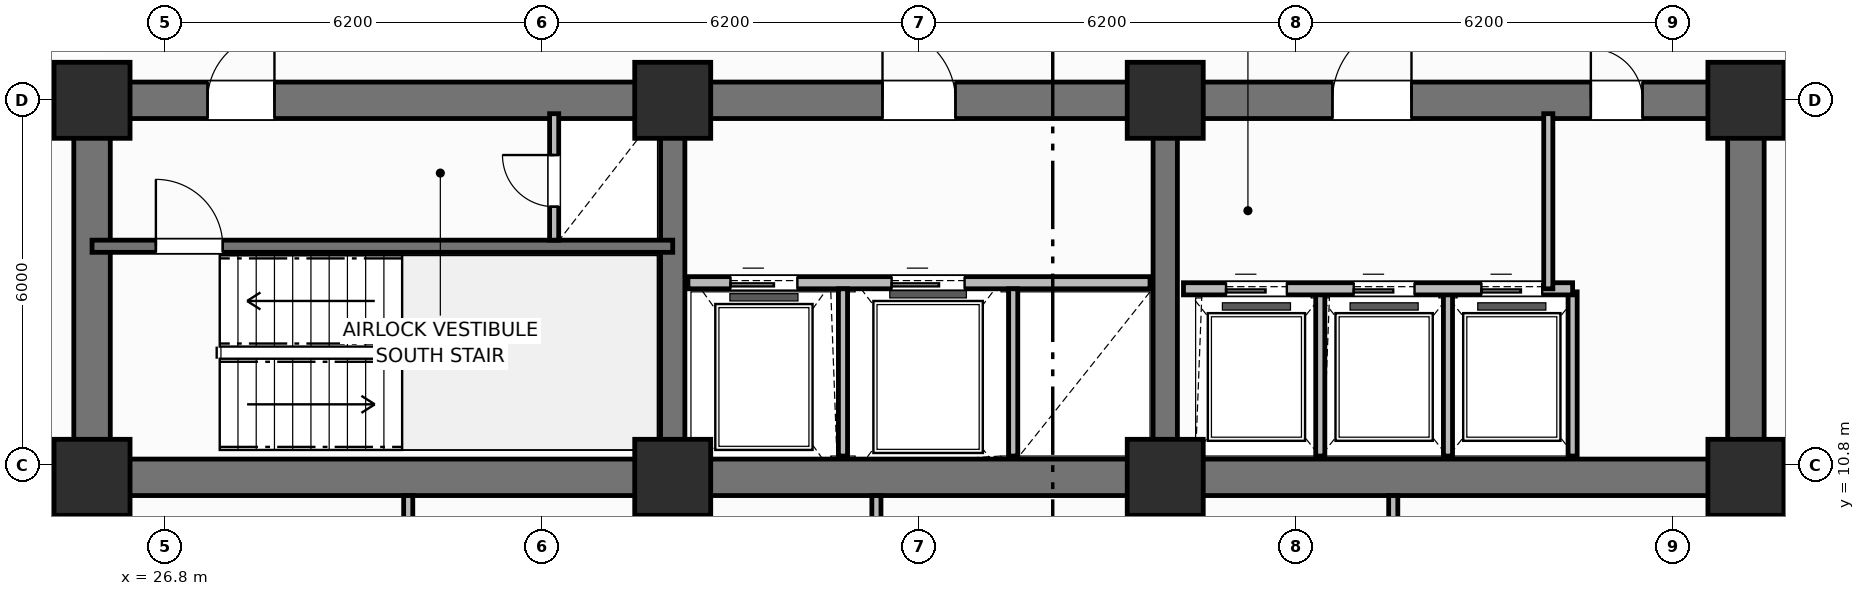
"""IFC4 building model, lengths in metres.
Left out: names, types, materials, properties, quantities, classifications, styles, units other than length and angle.
Written with IfcOpenShell. Run it as: python <this file> out.ifc"""

import sys

from ifc_helpers import new_model, si_unit, direction, frame, frame_2d, origin, origin_2d, place, context, subcontext, project, spatial, rectangle, extrude, element, fill, save


model = new_model("IFC4")
c1 = context("Model", 3, precision=1e-05, world=origin(), true_north=direction((0.0, 1.0)))
c2 = subcontext(c1, "Body", "Model", "MODEL_VIEW")
j1 = project(units=[si_unit("LENGTHUNIT", "METRE"), si_unit("PLANEANGLEUNIT", "RADIAN")], contexts=[c1])
p1 = place(None, origin())
s1 = spatial("IfcSite", under=j1, at=p1, CompositionType="ELEMENT")
p2 = place(p1, origin())
s2 = spatial("IfcBuilding", under=s1, at=p2, CompositionType="ELEMENT")
p3 = place(p2, frame((0.0, 0.0, 62.1)))
s3 = spatial("IfcBuildingStorey", under=s2, at=p3, CompositionType="ELEMENT", Elevation=62.1)
p4 = place(p3, frame((52.8, 10.6, 0.0), z_axis=(0.0, 0.0, 1.0), x_axis=(-1.0, 0.0, 0.0)))
e1 = element("IfcWall", 1, at=p4, inside=s3, PredefinedType="SHEAR", context=c2, shape_type="SweptSolid", body=[
    extrude(rectangle(XDim=27.2, YDim=0.6, at=frame_2d((13.6, 0.0))), origin(), (0.0, 0.0, 1.0), 3.7),
])
for number, where, z_axis, x_axis in (
    (2, (25.6, 10.9, 0.0), (0.0, 0.0, 1.0), (0.0, 1.0, 0.0)),
    (3, (52.8, 10.9, 0.0), (0.0, 0.0, 1.0), (0.0, 1.0, 0.0)),
):
    element("IfcWall", number, at=place(p3, frame(where, z_axis=z_axis, x_axis=x_axis)), inside=s3, PredefinedType="SHEAR", context=c2, shape_type="SweptSolid", body=[
        extrude(rectangle(XDim=5.6, YDim=0.6, at=frame_2d((2.8, 0.0))), origin(), (0.0, 0.0, 1.0), 3.7),
    ])
p5 = place(p3, frame((25.6, 16.8, 0.0), z_axis=(0.0, 0.0, 1.0), x_axis=(1.0, 0.0, 0.0)))
e4 = element("IfcWall", 4, at=p5, inside=s3, PredefinedType="SHEAR", context=c2, shape_type="SweptSolid", body=[
    extrude(rectangle(XDim=27.2, YDim=0.6, at=frame_2d((13.6, 0.0))), origin(), (0.0, 0.0, 1.0), 3.7),
])
p6 = place(p5, frame((1.9, 0.0, 0.0)))
e5 = element("IfcOpeningElement", 5, at=p6, cuts=e4, PredefinedType="OPENING", context=c2, shape_type="SweptSolid", body=[
    extrude(rectangle(XDim=1.1, YDim=2.15, at=frame_2d((0.55, 1.075))), frame((0.0, 0.31, 0.0), z_axis=(0.0, -1.0, 0.0), x_axis=(1.0, 0.0, 0.0)), (0.0, 0.0, 1.0), 0.62),
])
p7 = place(p5, frame((13.0, 0.0, 0.0)))
e6 = element("IfcOpeningElement", 6, at=p7, cuts=e4, PredefinedType="OPENING", context=c2, shape_type="SweptSolid", body=[
    extrude(rectangle(XDim=1.2, YDim=2.15, at=frame_2d((0.6, 1.075))), frame((0.0, 0.31, 0.0), z_axis=(0.0, -1.0, 0.0), x_axis=(1.0, 0.0, 0.0)), (0.0, 0.0, 1.0), 0.62),
])
p8 = place(p5, frame((20.4, 0.0, 0.0)))
e7 = element("IfcOpeningElement", 7, at=p8, cuts=e4, PredefinedType="OPENING", context=c2, shape_type="SweptSolid", body=[
    extrude(rectangle(XDim=1.3, YDim=2.2, at=frame_2d((0.65, 1.1))), frame((0.0, 0.31, 0.0), z_axis=(0.0, -1.0, 0.0), x_axis=(1.0, 0.0, 0.0)), (0.0, 0.0, 1.0), 0.62),
])
p9 = place(p5, frame((24.65, 0.0, 0.0)))
e8 = element("IfcOpeningElement", 8, at=p9, cuts=e4, PredefinedType="OPENING", context=c2, shape_type="SweptSolid", body=[
    extrude(rectangle(XDim=0.85, YDim=2.1, at=frame_2d((0.425, 1.05))), frame((0.0, 0.31, 0.0), z_axis=(0.0, -1.0, 0.0), x_axis=(1.0, 0.0, 0.0)), (0.0, 0.0, 1.0), 0.62),
])
for number, where, z_axis, x_axis in (
    (9, (35.15, 10.9, 0.0), (0.0, 0.0, 1.0), (0.0, 1.0, 0.0)),
    (10, (43.25, 10.9, 0.0), (0.0, 0.0, 1.0), (0.0, 1.0, 0.0)),
):
    element("IfcWall", number, at=place(p3, frame(where, z_axis=z_axis, x_axis=x_axis)), inside=s3, PredefinedType="SHEAR", context=c2, shape_type="SweptSolid", body=[
        extrude(rectangle(XDim=5.6, YDim=0.4, at=frame_2d((2.8, 0.0))), origin(), (0.0, 0.0, 1.0), 3.7),
    ])
for number, where, z_axis, x_axis in (
    (11, (25.6, 10.6, 0.0), (0.0, 0.0, 1.0), (1.0, 0.0, 0.0)),
    (12, (25.6, 16.8, 0.0), (0.0, 0.0, 1.0), (1.0, 0.0, 0.0)),
    (13, (35.15, 10.6, 0.0), (0.0, 0.0, 1.0), (1.0, 0.0, 0.0)),
    (14, (35.15, 16.8, 0.0), (0.0, 0.0, 1.0), (1.0, 0.0, 0.0)),
    (15, (43.25, 10.6, 0.0), (0.0, 0.0, 1.0), (1.0, 0.0, 0.0)),
    (16, (43.25, 16.8, 0.0), (0.0, 0.0, 1.0), (1.0, 0.0, 0.0)),
    (17, (52.8, 10.6, 0.0), (0.0, 0.0, 1.0), (1.0, 0.0, 0.0)),
    (18, (52.8, 16.8, 0.0), (0.0, 0.0, 1.0), (1.0, 0.0, 0.0)),
):
    element("IfcColumn", number, at=place(p3, frame(where, z_axis=z_axis, x_axis=x_axis)), inside=s3, PredefinedType="COLUMN", context=c2, shape_type="SweptSolid", body=[
        extrude(rectangle(XDim=1.25, YDim=1.25, at=origin_2d()), origin(), (0.0, 0.0, 1.0), 3.7),
    ])
p10 = place(p3, frame((25.6, 14.4, 0.0), z_axis=(0.0, 0.0, 1.0), x_axis=(1.0, 0.0, 0.0)))
e19 = element("IfcWall", 19, at=p10, inside=s3, PredefinedType="SHEAR", context=c2, shape_type="SweptSolid", body=[
    extrude(rectangle(XDim=9.55, YDim=0.2, at=frame_2d((4.775, 0.0))), origin(), (0.0, 0.0, 1.0), 3.7),
])
p11 = place(p10, frame((1.05, 0.0, 0.0)))
e20 = element("IfcOpeningElement", 20, at=p11, cuts=e19, PredefinedType="OPENING", context=c2, shape_type="SweptSolid", body=[
    extrude(rectangle(XDim=1.1, YDim=2.15, at=frame_2d((0.55, 1.075))), frame((0.0, 0.11, 0.0), z_axis=(0.0, -1.0, 0.0), x_axis=(1.0, 0.0, 0.0)), (0.0, 0.0, 1.0), 0.22),
])
p12 = place(p3, frame((33.2, 14.5, 0.0), z_axis=(0.0, 0.0, 1.0), x_axis=(0.0, 1.0, 0.0)))
e21 = element("IfcWall", 21, at=p12, inside=s3, PredefinedType="PARTITIONING", context=c2, shape_type="SweptSolid", body=[
    extrude(rectangle(XDim=2.08, YDim=0.15, at=frame_2d((1.04, 0.0))), origin(), (0.0, 0.0, 1.0), 2.53),
])
p13 = place(p12, frame((0.55, 0.0, 0.0)))
e22 = element("IfcOpeningElement", 22, at=p13, cuts=e21, PredefinedType="OPENING", context=c2, shape_type="SweptSolid", body=[
    extrude(rectangle(XDim=0.85, YDim=2.05, at=frame_2d((0.425, 1.025))), frame((0.0, 0.085, 0.0), z_axis=(0.0, -1.0, 0.0), x_axis=(1.0, 0.0, 0.0)), (0.0, 0.0, 1.0), 0.17),
])
p14 = place(p3, frame((35.4, 13.8, 0.0), z_axis=(0.0, 0.0, 1.0), x_axis=(1.0, 0.0, 0.0)))
e23 = element("IfcWall", 23, at=p14, inside=s3, PredefinedType="PARTITIONING", context=c2, shape_type="SweptSolid", body=[
    extrude(rectangle(XDim=7.6, YDim=0.2, at=frame_2d((3.8, 0.0))), origin(), (0.0, 0.0, 1.0), 2.3),
])
p15 = place(p14, frame((0.7, 0.0, 0.0)))
e24 = element("IfcOpeningElement", 24, at=p15, cuts=e23, PredefinedType="OPENING", context=c2, shape_type="SweptSolid", body=[
    extrude(rectangle(XDim=1.1, YDim=2.15, at=frame_2d((0.55, 1.075))), frame((0.0, 0.11, 0.0), z_axis=(0.0, -1.0, 0.0), x_axis=(1.0, 0.0, 0.0)), (0.0, 0.0, 1.0), 0.22),
])
p16 = place(p14, frame((3.35, 0.0, 0.0)))
e25 = element("IfcOpeningElement", 25, at=p16, cuts=e23, PredefinedType="OPENING", context=c2, shape_type="SweptSolid", body=[
    extrude(rectangle(XDim=1.2, YDim=2.15, at=frame_2d((0.6, 1.075))), frame((0.0, 0.11, 0.0), z_axis=(0.0, -1.0, 0.0), x_axis=(1.0, 0.0, 0.0)), (0.0, 0.0, 1.0), 0.22),
])
for number, where, z_axis, x_axis in (
    (26, (37.95, 10.95, 0.0), (0.0, 0.0, 1.0), (0.0, 1.0, 0.0)),
    (27, (40.75, 10.95, 0.0), (0.0, 0.0, 1.0), (0.0, 1.0, 0.0)),
):
    element("IfcWall", number, at=place(p3, frame(where, z_axis=z_axis, x_axis=x_axis)), inside=s3, PredefinedType="PARTITIONING", context=c2, shape_type="SweptSolid", body=[
        extrude(rectangle(XDim=2.75, YDim=0.15, at=frame_2d((1.375, 0.0))), origin(), (0.0, 0.0, 1.0), 2.53),
    ])
for number, where, z_axis, x_axis in (
    (28, (45.8, 10.95, 0.0), (0.0, 0.0, 1.0), (0.0, 1.0, 0.0)),
    (29, (47.9, 10.95, 0.0), (0.0, 0.0, 1.0), (0.0, 1.0, 0.0)),
    (30, (49.95, 10.95, 0.0), (0.0, 0.0, 1.0), (0.0, 1.0, 0.0)),
):
    element("IfcWall", number, at=place(p3, frame(where, z_axis=z_axis, x_axis=x_axis)), inside=s3, PredefinedType="PARTITIONING", context=c2, shape_type="SweptSolid", body=[
        extrude(rectangle(XDim=2.7, YDim=0.15, at=frame_2d((1.35, 0.0))), origin(), (0.0, 0.0, 1.0), 2.53),
    ])
p17 = place(p3, frame((43.55, 13.7, 0.0), z_axis=(0.0, 0.0, 1.0), x_axis=(1.0, 0.0, 0.0)))
e31 = element("IfcWall", 31, at=p17, inside=s3, PredefinedType="PARTITIONING", context=c2, shape_type="SweptSolid", body=[
    extrude(rectangle(XDim=6.4, YDim=0.2, at=frame_2d((3.2, 0.0))), origin(), (0.0, 0.0, 1.0), 2.53),
])
p18 = place(p17, frame((0.7, 0.0, 0.0)))
e32 = element("IfcOpeningElement", 32, at=p18, cuts=e31, PredefinedType="OPENING", context=c2, shape_type="SweptSolid", body=[
    extrude(rectangle(XDim=1.0, YDim=2.15, at=frame_2d((0.5, 1.075))), frame((0.0, 0.11, 0.0), z_axis=(0.0, -1.0, 0.0), x_axis=(1.0, 0.0, 0.0)), (0.0, 0.0, 1.0), 0.22),
])
p19 = place(p17, frame((2.8, 0.0, 0.0)))
e33 = element("IfcOpeningElement", 33, at=p19, cuts=e31, PredefinedType="OPENING", context=c2, shape_type="SweptSolid", body=[
    extrude(rectangle(XDim=1.0, YDim=2.15, at=frame_2d((0.5, 1.075))), frame((0.0, 0.11, 0.0), z_axis=(0.0, -1.0, 0.0), x_axis=(1.0, 0.0, 0.0)), (0.0, 0.0, 1.0), 0.22),
])
p20 = place(p17, frame((4.9, 0.0, 0.0)))
e34 = element("IfcOpeningElement", 34, at=p20, cuts=e31, PredefinedType="OPENING", context=c2, shape_type="SweptSolid", body=[
    extrude(rectangle(XDim=1.0, YDim=2.15, at=frame_2d((0.5, 1.075))), frame((0.0, 0.11, 0.0), z_axis=(0.0, -1.0, 0.0), x_axis=(1.0, 0.0, 0.0)), (0.0, 0.0, 1.0), 0.22),
])
p21 = place(p3, frame((49.55, 13.7, 0.0), z_axis=(0.0, 0.0, 1.0), x_axis=(0.0, 1.0, 0.0)))
e35 = element("IfcWall", 35, at=p21, inside=s3, PredefinedType="PARTITIONING", context=c2, shape_type="SweptSolid", body=[
    extrude(rectangle(XDim=2.88, YDim=0.15, at=frame_2d((1.44, 0.0))), origin(), (0.0, 0.0, 1.0), 2.53),
])
p22 = place(p3, frame((30.8, 4.97, 0.0), z_axis=(0.0, 0.0, 1.0), x_axis=(0.0, 1.0, 0.0)))
e36 = element("IfcWall", 36, at=p22, inside=s3, PredefinedType="PARTITIONING", context=c2, shape_type="SweptSolid", body=[
    extrude(rectangle(XDim=5.33, YDim=0.15, at=frame_2d((2.665, 0.0))), origin(), (0.0, 0.0, 1.0), 2.53),
])
p23 = place(p22, frame((1.4, 0.0, 0.0)))
e37 = element("IfcOpeningElement", 37, at=p23, cuts=e36, PredefinedType="OPENING", context=c2, shape_type="SweptSolid", body=[
    extrude(rectangle(XDim=0.9, YDim=2.1, at=frame_2d((0.45, 1.05))), frame((0.0, 0.085, 0.0), z_axis=(0.0, -1.0, 0.0), x_axis=(1.0, 0.0, 0.0)), (0.0, 0.0, 1.0), 0.17),
])
p24 = place(p3, frame((38.5, 4.97, 0.0), z_axis=(0.0, 0.0, 1.0), x_axis=(0.0, 1.0, 0.0)))
e38 = element("IfcWall", 38, at=p24, inside=s3, PredefinedType="PARTITIONING", context=c2, shape_type="SweptSolid", body=[
    extrude(rectangle(XDim=5.33, YDim=0.15, at=frame_2d((2.665, 0.0))), origin(), (0.0, 0.0, 1.0), 2.53),
])
p25 = place(p3, frame((47.0, 4.97, 0.0), z_axis=(0.0, 0.0, 1.0), x_axis=(0.0, 1.0, 0.0)))
e39 = element("IfcWall", 39, at=p25, inside=s3, PredefinedType="PARTITIONING", context=c2, shape_type="SweptSolid", body=[
    extrude(rectangle(XDim=5.33, YDim=0.15, at=frame_2d((2.665, 0.0))), origin(), (0.0, 0.0, 1.0), 2.53),
])
p26 = place(p25, frame((1.4, 0.0, 0.0)))
e40 = element("IfcOpeningElement", 40, at=p26, cuts=e39, PredefinedType="OPENING", context=c2, shape_type="SweptSolid", body=[
    extrude(rectangle(XDim=0.9, YDim=2.1, at=frame_2d((0.45, 1.05))), frame((0.0, 0.085, 0.0), z_axis=(0.0, -1.0, 0.0), x_axis=(1.0, 0.0, 0.0)), (0.0, 0.0, 1.0), 0.17),
])
p27 = place(p3, frame((25.4, 5.72, 0.0), z_axis=(0.0, 0.0, 1.0), x_axis=(0.0, 1.0, 0.0)))
e41 = element("IfcWall", 41, at=p27, inside=s3, PredefinedType="PARTITIONING", context=c2, shape_type="SweptSolid", body=[
    extrude(rectangle(XDim=4.58, YDim=0.2, at=frame_2d((2.29, 0.0))), origin(), (0.0, 0.0, 1.0), 2.53),
])
p28 = place(p27, frame((1.05, 0.0, 0.0)))
e42 = element("IfcOpeningElement", 42, at=p28, cuts=e41, PredefinedType="OPENING", context=c2, shape_type="SweptSolid", body=[
    extrude(rectangle(XDim=0.9, YDim=2.1, at=frame_2d((0.45, 1.05))), frame((0.0, 0.11, 0.0), z_axis=(0.0, -1.0, 0.0), x_axis=(1.0, 0.0, 0.0)), (0.0, 0.0, 1.0), 0.22),
])
p29 = place(p3, frame((53.0, 5.72, 0.0), z_axis=(0.0, 0.0, 1.0), x_axis=(0.0, 1.0, 0.0)))
e43 = element("IfcWall", 43, at=p29, inside=s3, PredefinedType="PARTITIONING", context=c2, shape_type="SweptSolid", body=[
    extrude(rectangle(XDim=4.58, YDim=0.2, at=frame_2d((2.29, 0.0))), origin(), (0.0, 0.0, 1.0), 2.53),
])
p30 = place(p29, frame((1.05, 0.0, 0.0)))
e44 = element("IfcOpeningElement", 44, at=p30, cuts=e43, PredefinedType="OPENING", context=c2, shape_type="SweptSolid", body=[
    extrude(rectangle(XDim=0.9, YDim=2.1, at=frame_2d((0.45, 1.05))), frame((0.0, 0.11, 0.0), z_axis=(0.0, -1.0, 0.0), x_axis=(1.0, 0.0, 0.0)), (0.0, 0.0, 1.0), 0.22),
])
p31 = place(p11, origin())
e45 = element("IfcDoor", 45, at=p31, inside=s3, OperationType="SINGLE_SWING_LEFT", PredefinedType="DOOR", context=c2, shape_type="SweptSolid", body=[
    extrude(rectangle(XDim=1.1, YDim=2.15, at=frame_2d((0.55, 1.075))), frame((0.0, 0.025, 0.0), z_axis=(0.0, -1.0, 0.0), x_axis=(1.0, 0.0, 0.0)), (0.0, 0.0, 1.0), 0.05),
])
fill(e20, e45)
p32 = place(p13, origin())
e46 = element("IfcDoor", 46, at=p32, inside=s3, OperationType="SINGLE_SWING_RIGHT", PredefinedType="TRAPDOOR", context=c2, shape_type="SweptSolid", body=[
    extrude(rectangle(XDim=0.85, YDim=2.05, at=frame_2d((0.425, 1.025))), frame((0.0, 0.025, 0.0), z_axis=(0.0, -1.0, 0.0), x_axis=(1.0, 0.0, 0.0)), (0.0, 0.0, 1.0), 0.05),
])
fill(e22, e46)
p33 = place(p15, origin())
e47 = element("IfcDoor", 47, at=p33, inside=s3, OperationType="SLIDING_TO_LEFT", PredefinedType="DOOR", context=c2, shape_type="SweptSolid", body=[
    extrude(rectangle(XDim=1.1, YDim=2.15, at=frame_2d((0.55, 1.075))), frame((0.0, 0.025, 0.0), z_axis=(0.0, -1.0, 0.0), x_axis=(1.0, 0.0, 0.0)), (0.0, 0.0, 1.0), 0.05),
])
fill(e24, e47)
p34 = place(p16, origin())
e48 = element("IfcDoor", 48, at=p34, inside=s3, OperationType="SLIDING_TO_LEFT", PredefinedType="DOOR", context=c2, shape_type="SweptSolid", body=[
    extrude(rectangle(XDim=1.2, YDim=2.15, at=frame_2d((0.6, 1.075))), frame((0.0, 0.025, 0.0), z_axis=(0.0, -1.0, 0.0), x_axis=(1.0, 0.0, 0.0)), (0.0, 0.0, 1.0), 0.05),
])
fill(e25, e48)
p35 = place(p18, origin())
e49 = element("IfcDoor", 49, at=p35, inside=s3, OperationType="SLIDING_TO_LEFT", PredefinedType="DOOR", context=c2, shape_type="SweptSolid", body=[
    extrude(rectangle(XDim=1.0, YDim=2.15, at=frame_2d((0.5, 1.075))), frame((0.0, 0.025, 0.0), z_axis=(0.0, -1.0, 0.0), x_axis=(1.0, 0.0, 0.0)), (0.0, 0.0, 1.0), 0.05),
])
fill(e32, e49)
p36 = place(p19, origin())
e50 = element("IfcDoor", 50, at=p36, inside=s3, OperationType="SLIDING_TO_LEFT", PredefinedType="DOOR", context=c2, shape_type="SweptSolid", body=[
    extrude(rectangle(XDim=1.0, YDim=2.15, at=frame_2d((0.5, 1.075))), frame((0.0, 0.025, 0.0), z_axis=(0.0, -1.0, 0.0), x_axis=(1.0, 0.0, 0.0)), (0.0, 0.0, 1.0), 0.05),
])
fill(e33, e50)
p37 = place(p20, origin())
e51 = element("IfcDoor", 51, at=p37, inside=s3, OperationType="SLIDING_TO_LEFT", PredefinedType="DOOR", context=c2, shape_type="SweptSolid", body=[
    extrude(rectangle(XDim=1.0, YDim=2.15, at=frame_2d((0.5, 1.075))), frame((0.0, 0.025, 0.0), z_axis=(0.0, -1.0, 0.0), x_axis=(1.0, 0.0, 0.0)), (0.0, 0.0, 1.0), 0.05),
])
fill(e34, e51)
p38 = place(p6, origin())
e52 = element("IfcDoor", 52, at=p38, inside=s3, OperationType="SINGLE_SWING_RIGHT", PredefinedType="DOOR", context=c2, shape_type="SweptSolid", body=[
    extrude(rectangle(XDim=1.1, YDim=2.15, at=frame_2d((0.55, 1.075))), frame((0.0, 0.025, 0.0), z_axis=(0.0, -1.0, 0.0), x_axis=(1.0, 0.0, 0.0)), (0.0, 0.0, 1.0), 0.05),
])
fill(e5, e52)
p39 = place(p7, origin())
e53 = element("IfcDoor", 53, at=p39, inside=s3, OperationType="SINGLE_SWING_LEFT", PredefinedType="DOOR", context=c2, shape_type="SweptSolid", body=[
    extrude(rectangle(XDim=1.2, YDim=2.15, at=frame_2d((0.6, 1.075))), frame((0.0, 0.025, 0.0), z_axis=(0.0, -1.0, 0.0), x_axis=(1.0, 0.0, 0.0)), (0.0, 0.0, 1.0), 0.05),
])
fill(e6, e53)
p40 = place(p8, origin())
e54 = element("IfcDoor", 54, at=p40, inside=s3, OperationType="SINGLE_SWING_RIGHT", PredefinedType="DOOR", context=c2, shape_type="SweptSolid", body=[
    extrude(rectangle(XDim=1.3, YDim=2.2, at=frame_2d((0.65, 1.1))), frame((0.0, 0.025, 0.0), z_axis=(0.0, -1.0, 0.0), x_axis=(1.0, 0.0, 0.0)), (0.0, 0.0, 1.0), 0.05),
])
fill(e7, e54)
p41 = place(p9, origin())
e55 = element("IfcDoor", 55, at=p41, inside=s3, OperationType="SINGLE_SWING_LEFT", PredefinedType="DOOR", context=c2, shape_type="SweptSolid", body=[
    extrude(rectangle(XDim=0.85, YDim=2.1, at=frame_2d((0.425, 1.05))), frame((0.0, 0.025, 0.0), z_axis=(0.0, -1.0, 0.0), x_axis=(1.0, 0.0, 0.0)), (0.0, 0.0, 1.0), 0.05),
])
fill(e8, e55)
save(model, sys.argv[1])
